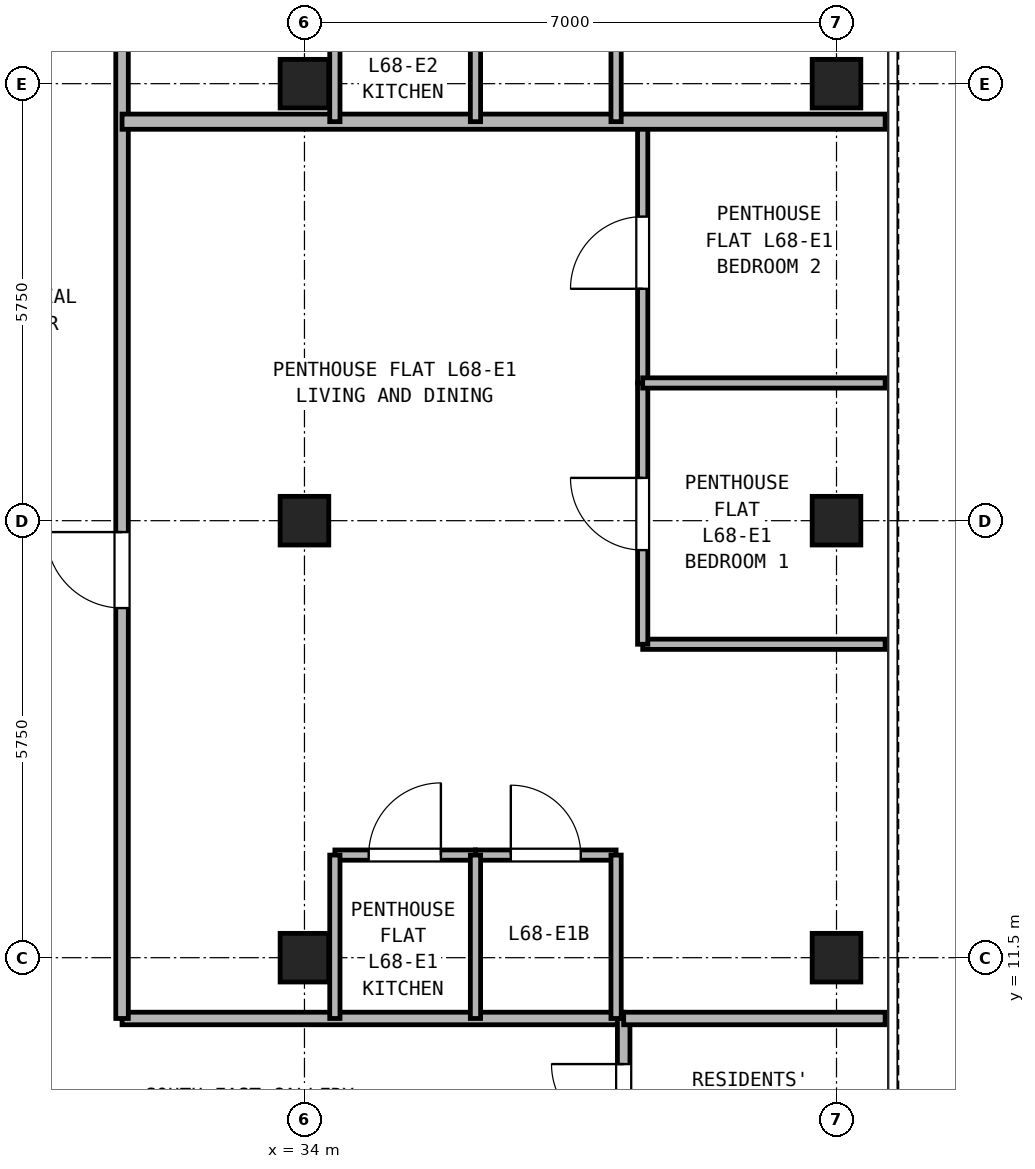
"""IFC4 building model, lengths in metres.
Left out: names, types, materials, properties, quantities, classifications, styles, units other than length and angle.
Written with IfcOpenShell. Run it as: python <this file> out.ifc"""

import sys

from ifc_helpers import new_model, si_unit, direction, frame, frame_2d, origin, origin_2d, place, context, subcontext, project, spatial, rectangle, hollow_rectangle, extrude, source, transform, mapped, element, fill, save


model = new_model("IFC4")
c1 = context("Model", 3, precision=1e-05, world=origin(), true_north=direction((0.0, 1.0)))
c2 = subcontext(c1, "Body", "Model", "MODEL_VIEW")
j1 = project(units=[si_unit("LENGTHUNIT", "METRE"), si_unit("PLANEANGLEUNIT", "RADIAN")], contexts=[c1])
p1 = place(None, origin())
s1 = spatial("IfcSite", under=j1, at=p1, CompositionType="ELEMENT")
p2 = place(p1, origin())
s2 = spatial("IfcBuilding", under=s1, at=p2, CompositionType="ELEMENT")
p3 = place(p2, frame((0.0, 0.0, 239.3)))
s3 = spatial("IfcBuildingStorey", under=s2, at=p3, CompositionType="ELEMENT", Elevation=239.3)
m1 = source(origin(), c2, "Body", "SweptSolid", [
    extrude(hollow_rectangle(XDim=0.64, YDim=0.64, WallThickness=0.035, at=origin_2d()), origin(), (0.0, 0.0, 1.0), 2.98),
])
for number, where, z_axis, x_axis in (
    (1, (41.0, 11.5, 0.0), (0.0, 0.0, 1.0), (1.0, 0.0, 0.0)),
    (2, (41.0, 17.25, 0.0), (0.0, 0.0, 1.0), (1.0, 0.0, 0.0)),
    (3, (41.0, 23.0, 0.0), (0.0, 0.0, 1.0), (1.0, 0.0, 0.0)),
    (4, (34.0, 11.5, 0.0), (0.0, 0.0, 1.0), (1.0, 0.0, 0.0)),
    (5, (34.0, 17.25, 0.0), (0.0, 0.0, 1.0), (1.0, 0.0, 0.0)),
    (6, (34.0, 23.0, 0.0), (0.0, 0.0, 1.0), (1.0, 0.0, 0.0)),
):
    element("IfcColumn", number, at=place(p3, frame(where, z_axis=z_axis, x_axis=x_axis)), inside=s3, PredefinedType="COLUMN", context=c2, shape_type="MappedRepresentation", body=[
        mapped(m1, transform((0.0, 0.0, 0.0), x_axis=(1.0, 0.0, 0.0), y_axis=(0.0, 1.0, 0.0), z_axis=(0.0, 0.0, 1.0), scale=1.0)),
    ])
p4 = place(p3, frame((31.6, 10.7, 0.0), z_axis=(0.0, 0.0, 1.0), x_axis=(1.0, 0.0, 0.0)))
e7 = element("IfcWall", 7, at=p4, inside=s3, PredefinedType="PARTITIONING", context=c2, shape_type="SweptSolid", body=[
    extrude(rectangle(XDim=6.6, YDim=0.165, at=frame_2d((3.3, 0.0))), origin(), (0.0, 0.0, 1.0), 2.98),
])
p5 = place(p3, frame((38.2, 8.7, 0.0), z_axis=(0.0, 0.0, 1.0), x_axis=(0.0, 1.0, 0.0)))
e8 = element("IfcWall", 8, at=p5, inside=s3, PredefinedType="PARTITIONING", context=c2, shape_type="SweptSolid", body=[
    extrude(rectangle(XDim=2.0, YDim=0.165, at=frame_2d((1.0, 0.0))), origin(), (0.0, 0.0, 1.0), 2.98),
])
p6 = place(p5, frame((0.45, 0.0, 0.0)))
e9 = element("IfcOpeningElement", 9, at=p6, cuts=e8, PredefinedType="OPENING", context=c2, shape_type="SweptSolid", body=[
    extrude(rectangle(XDim=0.95, YDim=2.15, at=frame_2d((0.475, 1.075))), frame((0.0, 0.093, 0.0), z_axis=(0.0, -1.0, 0.0), x_axis=(1.0, 0.0, 0.0)), (0.0, 0.0, 1.0), 0.185),
])
p7 = place(p3, frame((31.6, 10.7, 0.0), z_axis=(0.0, 0.0, 1.0), x_axis=(0.0, 1.0, 0.0)))
e10 = element("IfcWall", 10, at=p7, inside=s3, PredefinedType="PARTITIONING", context=c2, shape_type="SweptSolid", body=[
    extrude(rectangle(XDim=24.44, YDim=0.165, at=frame_2d((12.22, 0.0))), origin(), (0.0, 0.0, 1.0), 2.98),
])
p8 = place(p7, frame((5.4, 0.0, 0.0)))
e11 = element("IfcOpeningElement", 11, at=p8, cuts=e10, PredefinedType="OPENING", context=c2, shape_type="SweptSolid", body=[
    extrude(rectangle(XDim=1.0, YDim=2.15, at=frame_2d((0.5, 1.075))), frame((0.0, 0.093, 0.0), z_axis=(0.0, -1.0, 0.0), x_axis=(1.0, 0.0, 0.0)), (0.0, 0.0, 1.0), 0.185),
])
p9 = place(p7, frame((15.7, 0.0, 0.0)))
e12 = element("IfcOpeningElement", 12, at=p9, cuts=e10, PredefinedType="OPENING", context=c2, shape_type="SweptSolid", body=[
    extrude(rectangle(XDim=1.0, YDim=2.15, at=frame_2d((0.5, 1.075))), frame((0.0, 0.093, 0.0), z_axis=(0.0, -1.0, 0.0), x_axis=(1.0, 0.0, 0.0)), (0.0, 0.0, 1.0), 0.185),
])
p10 = place(p3, frame((38.2, 10.7, 0.0), z_axis=(0.0, 0.0, 1.0), x_axis=(1.0, 0.0, 0.0)))
e13 = element("IfcWall", 13, at=p10, inside=s3, PredefinedType="PARTITIONING", context=c2, shape_type="SweptSolid", body=[
    extrude(rectangle(XDim=3.44, YDim=0.165, at=frame_2d((1.72, 0.0))), origin(), (0.0, 0.0, 1.0), 2.98),
])
p11 = place(p3, frame((34.4, 12.85, 0.0), z_axis=(0.0, 0.0, 1.0), x_axis=(1.0, 0.0, 0.0)))
e14 = element("IfcWall", 14, at=p11, inside=s3, PredefinedType="PARTITIONING", context=c2, shape_type="SweptSolid", body=[
    extrude(rectangle(XDim=1.85, YDim=0.135, at=frame_2d((0.925, 0.0))), origin(), (0.0, 0.0, 1.0), 2.98),
])
p12 = place(p11, frame((0.445, 0.0, 0.0)))
e15 = element("IfcOpeningElement", 15, at=p12, cuts=e14, PredefinedType="OPENING", context=c2, shape_type="SweptSolid", body=[
    extrude(rectangle(XDim=0.95, YDim=2.15, at=frame_2d((0.475, 1.075))), frame((0.0, 0.077, 0.0), z_axis=(0.0, -1.0, 0.0), x_axis=(1.0, 0.0, 0.0)), (0.0, 0.0, 1.0), 0.155),
])
p13 = place(p3, frame((36.25, 12.85, 0.0), z_axis=(0.0, 0.0, 1.0), x_axis=(1.0, 0.0, 0.0)))
e16 = element("IfcWall", 16, at=p13, inside=s3, PredefinedType="PARTITIONING", context=c2, shape_type="SweptSolid", body=[
    extrude(rectangle(XDim=1.85, YDim=0.135, at=frame_2d((0.925, 0.0))), origin(), (0.0, 0.0, 1.0), 2.98),
])
p14 = place(p13, frame((0.465, 0.0, 0.0)))
e17 = element("IfcOpeningElement", 17, at=p14, cuts=e16, PredefinedType="OPENING", context=c2, shape_type="SweptSolid", body=[
    extrude(rectangle(XDim=0.92, YDim=2.1, at=frame_2d((0.46, 1.05))), frame((0.0, 0.077, 0.0), z_axis=(0.0, -1.0, 0.0), x_axis=(1.0, 0.0, 0.0)), (0.0, 0.0, 1.0), 0.155),
])
for number, where, z_axis, x_axis in (
    (18, (34.4, 10.7, 0.0), (0.0, 0.0, 1.0), (0.0, 1.0, 0.0)),
    (19, (36.25, 10.7, 0.0), (0.0, 0.0, 1.0), (0.0, 1.0, 0.0)),
    (20, (38.1, 10.7, 0.0), (0.0, 0.0, 1.0), (0.0, 1.0, 0.0)),
):
    element("IfcWall", number, at=place(p3, frame(where, z_axis=z_axis, x_axis=x_axis)), inside=s3, PredefinedType="PARTITIONING", context=c2, shape_type="SweptSolid", body=[
        extrude(rectangle(XDim=2.15, YDim=0.135, at=frame_2d((1.075, 0.0))), origin(), (0.0, 0.0, 1.0), 2.98),
    ])
p15 = place(p3, frame((38.45, 15.624, 0.0), z_axis=(0.0, 0.0, 1.0), x_axis=(1.0, 0.0, 0.0)))
e21 = element("IfcWall", 21, at=p15, inside=s3, PredefinedType="PARTITIONING", context=c2, shape_type="SweptSolid", body=[
    extrude(rectangle(XDim=3.19, YDim=0.135, at=frame_2d((1.595, 0.0))), origin(), (0.0, 0.0, 1.0), 2.98),
])
p16 = place(p3, frame((38.45, 15.624, 0.0), z_axis=(0.0, 0.0, 1.0), x_axis=(0.0, 1.0, 0.0)))
e22 = element("IfcWall", 22, at=p16, inside=s3, PredefinedType="PARTITIONING", context=c2, shape_type="SweptSolid", body=[
    extrude(rectangle(XDim=3.438, YDim=0.135, at=frame_2d((1.719, 0.0))), origin(), (0.0, 0.0, 1.0), 2.98),
])
p17 = place(p16, frame((1.239, 0.0, 0.0)))
e23 = element("IfcOpeningElement", 23, at=p17, cuts=e22, PredefinedType="OPENING", context=c2, shape_type="SweptSolid", body=[
    extrude(rectangle(XDim=0.95, YDim=2.15, at=frame_2d((0.475, 1.075))), frame((0.0, 0.077, 0.0), z_axis=(0.0, -1.0, 0.0), x_axis=(1.0, 0.0, 0.0)), (0.0, 0.0, 1.0), 0.155),
])
p18 = place(p3, frame((38.45, 19.062, 0.0), z_axis=(0.0, 0.0, 1.0), x_axis=(0.0, 1.0, 0.0)))
e24 = element("IfcWall", 24, at=p18, inside=s3, PredefinedType="PARTITIONING", context=c2, shape_type="SweptSolid", body=[
    extrude(rectangle(XDim=3.438, YDim=0.135, at=frame_2d((1.719, 0.0))), origin(), (0.0, 0.0, 1.0), 2.98),
])
p19 = place(p18, frame((1.239, 0.0, 0.0)))
e25 = element("IfcOpeningElement", 25, at=p19, cuts=e24, PredefinedType="OPENING", context=c2, shape_type="SweptSolid", body=[
    extrude(rectangle(XDim=0.95, YDim=2.15, at=frame_2d((0.475, 1.075))), frame((0.0, 0.077, 0.0), z_axis=(0.0, -1.0, 0.0), x_axis=(1.0, 0.0, 0.0)), (0.0, 0.0, 1.0), 0.155),
])
p20 = place(p3, frame((38.45, 19.062, 0.0), z_axis=(0.0, 0.0, 1.0), x_axis=(1.0, 0.0, 0.0)))
e26 = element("IfcWall", 26, at=p20, inside=s3, PredefinedType="PARTITIONING", context=c2, shape_type="SweptSolid", body=[
    extrude(rectangle(XDim=3.19, YDim=0.135, at=frame_2d((1.595, 0.0))), origin(), (0.0, 0.0, 1.0), 2.98),
])
p21 = place(p3, frame((31.6, 22.5, 0.0), z_axis=(0.0, 0.0, 1.0), x_axis=(1.0, 0.0, 0.0)))
e27 = element("IfcWall", 27, at=p21, inside=s3, PredefinedType="PARTITIONING", context=c2, shape_type="SweptSolid", body=[
    extrude(rectangle(XDim=10.04, YDim=0.2, at=frame_2d((5.02, 0.0))), origin(), (0.0, 0.0, 1.0), 2.98),
])
for number, where, z_axis, x_axis in (
    (28, (34.4, 22.5, 0.0), (0.0, 0.0, 1.0), (0.0, 1.0, 0.0)),
    (29, (36.25, 22.5, 0.0), (0.0, 0.0, 1.0), (0.0, 1.0, 0.0)),
    (30, (38.1, 22.5, 0.0), (0.0, 0.0, 1.0), (0.0, 1.0, 0.0)),
):
    element("IfcWall", number, at=place(p3, frame(where, z_axis=z_axis, x_axis=x_axis)), inside=s3, PredefinedType="PARTITIONING", context=c2, shape_type="SweptSolid", body=[
        extrude(rectangle(XDim=2.15, YDim=0.135, at=frame_2d((1.075, 0.0))), origin(), (0.0, 0.0, 1.0), 2.98),
    ])
p22 = place(p6, origin())
e31 = element("IfcDoor", 31, at=p22, inside=s3, OperationType="SINGLE_SWING_RIGHT", PredefinedType="DOOR", context=c2, shape_type="SweptSolid", body=[
    extrude(rectangle(XDim=0.95, YDim=2.15, at=frame_2d((0.475, 1.075))), frame((0.0, 0.025, 0.0), z_axis=(0.0, -1.0, 0.0), x_axis=(1.0, 0.0, 0.0)), (0.0, 0.0, 1.0), 0.05),
])
fill(e9, e31)
p23 = place(p12, origin())
e32 = element("IfcDoor", 32, at=p23, inside=s3, OperationType="SINGLE_SWING_RIGHT", PredefinedType="DOOR", context=c2, shape_type="SweptSolid", body=[
    extrude(rectangle(XDim=0.95, YDim=2.15, at=frame_2d((0.475, 1.075))), frame((0.0, 0.025, 0.0), z_axis=(0.0, -1.0, 0.0), x_axis=(1.0, 0.0, 0.0)), (0.0, 0.0, 1.0), 0.05),
])
fill(e15, e32)
p24 = place(p14, origin())
e33 = element("IfcDoor", 33, at=p24, inside=s3, OperationType="SINGLE_SWING_LEFT", PredefinedType="DOOR", context=c2, shape_type="SweptSolid", body=[
    extrude(rectangle(XDim=0.92, YDim=2.1, at=frame_2d((0.46, 1.05))), frame((0.0, 0.025, 0.0), z_axis=(0.0, -1.0, 0.0), x_axis=(1.0, 0.0, 0.0)), (0.0, 0.0, 1.0), 0.05),
])
fill(e17, e33)
p25 = place(p17, frame((0.95, 0.0, 0.0), z_axis=(0.0, 0.0, 1.0), x_axis=(-1.0, 0.0, 0.0)))
e34 = element("IfcDoor", 34, at=p25, inside=s3, OperationType="SINGLE_SWING_RIGHT", PredefinedType="DOOR", context=c2, shape_type="SweptSolid", body=[
    extrude(rectangle(XDim=0.95, YDim=2.15, at=frame_2d((0.475, 1.075))), frame((0.0, 0.025, 0.0), z_axis=(0.0, -1.0, 0.0), x_axis=(1.0, 0.0, 0.0)), (0.0, 0.0, 1.0), 0.05),
])
fill(e23, e34)
p26 = place(p19, frame((0.95, 0.0, 0.0), z_axis=(0.0, 0.0, 1.0), x_axis=(-1.0, 0.0, 0.0)))
e35 = element("IfcDoor", 35, at=p26, inside=s3, OperationType="SINGLE_SWING_LEFT", PredefinedType="DOOR", context=c2, shape_type="SweptSolid", body=[
    extrude(rectangle(XDim=0.95, YDim=2.15, at=frame_2d((0.475, 1.075))), frame((0.0, 0.025, 0.0), z_axis=(0.0, -1.0, 0.0), x_axis=(1.0, 0.0, 0.0)), (0.0, 0.0, 1.0), 0.05),
])
fill(e25, e35)
p27 = place(p8, frame((1.0, 0.0, 0.0), z_axis=(0.0, 0.0, 1.0), x_axis=(-1.0, 0.0, 0.0)))
e36 = element("IfcDoor", 36, at=p27, inside=s3, OperationType="SINGLE_SWING_RIGHT", PredefinedType="DOOR", context=c2, shape_type="SweptSolid", body=[
    extrude(rectangle(XDim=1.0, YDim=2.15, at=frame_2d((0.5, 1.075))), frame((0.0, 0.025, 0.0), z_axis=(0.0, -1.0, 0.0), x_axis=(1.0, 0.0, 0.0)), (0.0, 0.0, 1.0), 0.05),
])
fill(e11, e36)
save(model, sys.argv[1])
